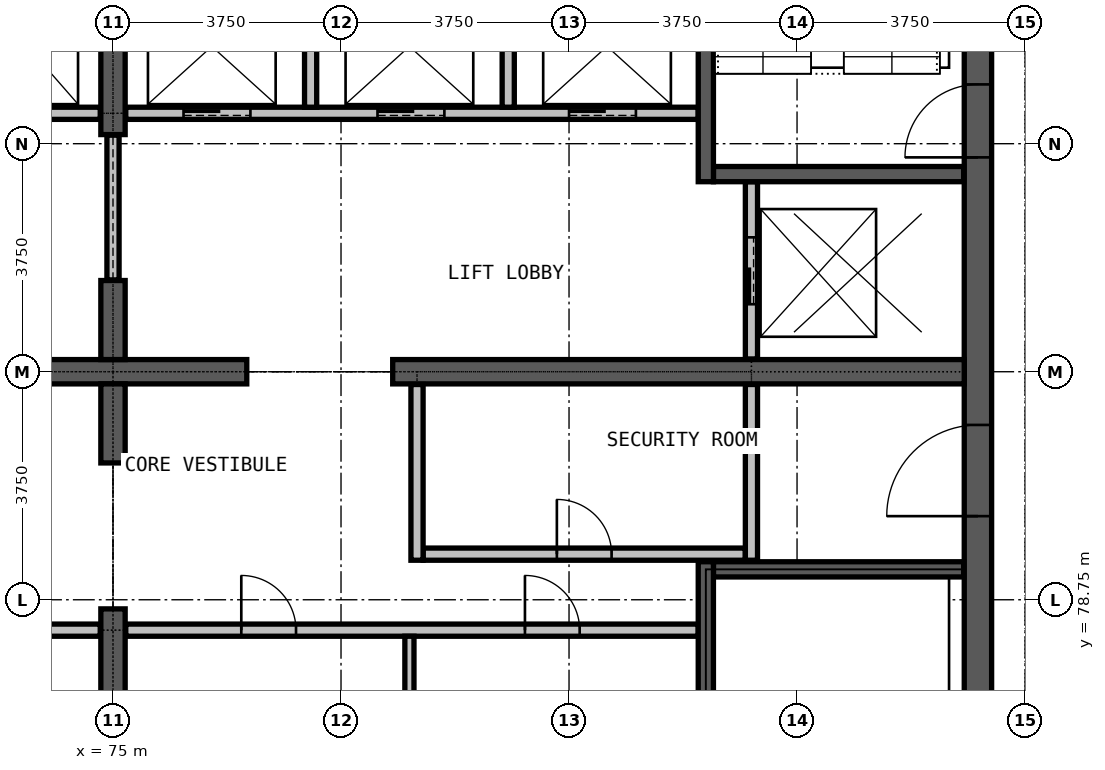
"""IFC4 building model, lengths in metres.
Left out: names, types, materials, properties, quantities, classifications, styles, units other than length and angle.
Written with IfcOpenShell. Run it as: python <this file> out.ifc"""

import sys

from ifc_helpers import new_model, si_unit, direction, frame, frame_2d, origin, place, context, subcontext, project, spatial, rectangle, extrude, element, fill, save


model = new_model("IFC4")
c1 = context("Model", 3, precision=1e-05, world=origin(), true_north=direction((0.0, 1.0)))
c2 = subcontext(c1, "Body", "Model", "MODEL_VIEW")
j1 = project(units=[si_unit("LENGTHUNIT", "METRE"), si_unit("PLANEANGLEUNIT", "RADIAN")], contexts=[c1])
p1 = place(None, origin())
s1 = spatial("IfcSite", under=j1, at=p1, CompositionType="ELEMENT")
p2 = place(p1, origin())
s2 = spatial("IfcBuilding", under=s1, at=p2, CompositionType="ELEMENT")
p3 = place(p2, frame((0.0, 0.0, 258.5)))
s3 = spatial("IfcBuildingStorey", under=s2, at=p3, CompositionType="ELEMENT", Elevation=258.5)
p4 = place(p3, frame((89.225, 72.25, 0.0), z_axis=(0.0, 0.0, 1.0), x_axis=(0.0, 1.0, 0.0)))
e1 = element("IfcWall", 1, at=p4, inside=s3, PredefinedType="SHEAR", context=c2, shape_type="SweptSolid", body=[
    extrude(rectangle(XDim=20.5, YDim=0.45, at=frame_2d((10.25, 0.0))), origin(), (0.0, 0.0, 1.0), 3.6),
])
p5 = place(p4, frame((0.275, 0.0, 0.0)))
e2 = element("IfcOpeningElement", 2, at=p5, cuts=e1, PredefinedType="OPENING", context=c2, shape_type="SweptSolid", body=[
    extrude(rectangle(XDim=1.2, YDim=2.2, at=frame_2d((0.6, 1.1))), frame((0.0, 0.235, 0.0), z_axis=(0.0, -1.0, 0.0), x_axis=(1.0, 0.0, 0.0)), (0.0, 0.0, 1.0), 0.47),
])
p6 = place(p4, frame((13.775, 0.0, 0.0)))
e3 = element("IfcOpeningElement", 3, at=p6, cuts=e1, PredefinedType="OPENING", context=c2, shape_type="SweptSolid", body=[
    extrude(rectangle(XDim=1.2, YDim=2.2, at=frame_2d((0.6, 1.1))), frame((0.0, 0.235, 0.0), z_axis=(0.0, -1.0, 0.0), x_axis=(1.0, 0.0, 0.0)), (0.0, 0.0, 1.0), 0.47),
])
p7 = place(p4, frame((7.875, 0.0, 0.0)))
e4 = element("IfcOpeningElement", 4, at=p7, cuts=e1, PredefinedType="OPENING", context=c2, shape_type="SweptSolid", body=[
    extrude(rectangle(XDim=1.5, YDim=2.2, at=frame_2d((0.75, 1.1))), frame((0.0, 0.235, 0.0), z_axis=(0.0, -1.0, 0.0), x_axis=(1.0, 0.0, 0.0)), (0.0, 0.0, 1.0), 0.47),
])
p8 = place(p3, frame((72.8, 82.5, 0.0), z_axis=(0.0, 0.0, 1.0), x_axis=(1.0, 0.0, 0.0)))
e5 = element("IfcWall", 5, at=p8, inside=s3, PredefinedType="SHEAR", context=c2, shape_type="SweptSolid", body=[
    extrude(rectangle(XDim=4.4, YDim=0.4, at=frame_2d((2.2, 0.0))), origin(), (0.0, 0.0, 1.0), 3.6),
])
p9 = place(p3, frame((79.6, 82.5, 0.0), z_axis=(0.0, 0.0, 1.0), x_axis=(1.0, 0.0, 0.0)))
e6 = element("IfcWall", 6, at=p9, inside=s3, PredefinedType="SHEAR", context=c2, shape_type="SweptSolid", body=[
    extrude(rectangle(XDim=9.4, YDim=0.4, at=frame_2d((4.7, 0.0))), origin(), (0.0, 0.0, 1.0), 3.6),
])
p10 = place(p3, frame((75.0, 72.25, 0.0), z_axis=(0.0, 0.0, 1.0), x_axis=(0.0, 1.0, 0.0)))
e7 = element("IfcWall", 7, at=p10, inside=s3, PredefinedType="SHEAR", context=c2, shape_type="SweptSolid", body=[
    extrude(rectangle(XDim=6.35, YDim=0.4, at=frame_2d((3.175, 0.0))), origin(), (0.0, 0.0, 1.0), 3.6),
])
for number, where, z_axis, x_axis in (
    (8, (75.0, 81.0, 0.0), (0.0, 0.0, 1.0), (0.0, 1.0, 0.0)),
    (9, (75.0, 82.7, 0.0), (0.0, 0.0, 1.0), (0.0, 1.0, 0.0)),
):
    element("IfcWall", number, at=place(p3, frame(where, z_axis=z_axis, x_axis=x_axis)), inside=s3, PredefinedType="SHEAR", context=c2, shape_type="SweptSolid", body=[
        extrude(rectangle(XDim=1.3, YDim=0.4, at=frame_2d((0.65, 0.0))), origin(), (0.0, 0.0, 1.0), 3.6),
    ])
p11 = place(p3, frame((75.0, 86.4, 0.0), z_axis=(0.0, 0.0, 1.0), x_axis=(0.0, 1.0, 0.0)))
e10 = element("IfcWall", 10, at=p11, inside=s3, PredefinedType="SHEAR", context=c2, shape_type="SweptSolid", body=[
    extrude(rectangle(XDim=6.35, YDim=0.4, at=frame_2d((3.175, 0.0))), origin(), (0.0, 0.0, 1.0), 3.6),
])
p12 = place(p3, frame((65.375, 78.25, 0.0), z_axis=(0.0, 0.0, 1.0), x_axis=(1.0, 0.0, 0.0)))
e11 = element("IfcWall", 11, at=p12, inside=s3, PredefinedType="PARTITIONING", context=c2, shape_type="SweptSolid", body=[
    extrude(rectangle(XDim=9.415, YDim=0.2, at=frame_2d((4.708, 0.0))), origin(), (0.0, 0.0, 1.0), 3.3),
])
p13 = place(p12, frame((1.0, 0.0, 0.0)))
e12 = element("IfcOpeningElement", 12, at=p13, cuts=e11, PredefinedType="OPENING", context=c2, shape_type="SweptSolid", body=[
    extrude(rectangle(XDim=0.9, YDim=2.2, at=frame_2d((0.45, 1.1))), frame((0.0, 0.11, 0.0), z_axis=(0.0, -1.0, 0.0), x_axis=(1.0, 0.0, 0.0)), (0.0, 0.0, 1.0), 0.22),
])
p14 = place(p12, frame((5.665, 0.0, 0.0)))
e13 = element("IfcOpeningElement", 13, at=p14, cuts=e11, PredefinedType="OPENING", context=c2, shape_type="SweptSolid", body=[
    extrude(rectangle(XDim=0.9, YDim=2.2, at=frame_2d((0.45, 1.1))), frame((0.0, 0.11, 0.0), z_axis=(0.0, -1.0, 0.0), x_axis=(1.0, 0.0, 0.0)), (0.0, 0.0, 1.0), 0.22),
])
p15 = place(p3, frame((75.21, 78.25, 0.0), z_axis=(0.0, 0.0, 1.0), x_axis=(1.0, 0.0, 0.0)))
e14 = element("IfcWall", 14, at=p15, inside=s3, PredefinedType="PARTITIONING", context=c2, shape_type="SweptSolid", body=[
    extrude(rectangle(XDim=9.415, YDim=0.2, at=frame_2d((4.708, 0.0))), origin(), (0.0, 0.0, 1.0), 3.3),
])
p16 = place(p15, frame((1.9, 0.0, 0.0)))
e15 = element("IfcOpeningElement", 15, at=p16, cuts=e14, PredefinedType="OPENING", context=c2, shape_type="SweptSolid", body=[
    extrude(rectangle(XDim=0.9, YDim=2.2, at=frame_2d((0.45, 1.1))), frame((0.0, 0.11, 0.0), z_axis=(0.0, -1.0, 0.0), x_axis=(1.0, 0.0, 0.0)), (0.0, 0.0, 1.0), 0.22),
])
p17 = place(p15, frame((6.565, 0.0, 0.0)))
e16 = element("IfcOpeningElement", 16, at=p17, cuts=e14, PredefinedType="OPENING", context=c2, shape_type="SweptSolid", body=[
    extrude(rectangle(XDim=0.9, YDim=2.2, at=frame_2d((0.45, 1.1))), frame((0.0, 0.11, 0.0), z_axis=(0.0, -1.0, 0.0), x_axis=(1.0, 0.0, 0.0)), (0.0, 0.0, 1.0), 0.22),
])
p18 = place(p3, frame((80.1, 79.5, 0.0), z_axis=(0.0, 0.0, 1.0), x_axis=(1.0, 0.0, 0.0)))
e17 = element("IfcWall", 17, at=p18, inside=s3, PredefinedType="PARTITIONING", context=c2, shape_type="SweptSolid", body=[
    extrude(rectangle(XDim=5.3, YDim=0.2, at=frame_2d((2.65, 0.0))), origin(), (0.0, 0.0, 1.0), 3.3),
])
p19 = place(p18, frame((2.2, 0.0, 0.0)))
e18 = element("IfcOpeningElement", 18, at=p19, cuts=e17, PredefinedType="OPENING", context=c2, shape_type="SweptSolid", body=[
    extrude(rectangle(XDim=0.9, YDim=2.2, at=frame_2d((0.45, 1.1))), frame((0.0, 0.11, 0.0), z_axis=(0.0, -1.0, 0.0), x_axis=(1.0, 0.0, 0.0)), (0.0, 0.0, 1.0), 0.22),
])
p20 = place(p3, frame((75.0, 84.01, 0.0), z_axis=(0.0, 0.0, 1.0), x_axis=(0.0, 1.0, 0.0)))
e19 = element("IfcWall", 19, at=p20, inside=s3, PredefinedType="PARTITIONING", context=c2, shape_type="SweptSolid", body=[
    extrude(rectangle(XDim=2.38, YDim=0.2, at=frame_2d((1.19, 0.0))), origin(), (0.0, 0.0, 1.0), 2.4),
])
for number, where, z_axis, x_axis in (
    (20, (80.0, 79.4, 0.0), (0.0, 0.0, 1.0), (0.0, 1.0, 0.0)),
    (21, (85.5, 79.4, 0.0), (0.0, 0.0, 1.0), (0.0, 1.0, 0.0)),
):
    element("IfcWall", number, at=place(p3, frame(where, z_axis=z_axis, x_axis=x_axis)), inside=s3, PredefinedType="PARTITIONING", context=c2, shape_type="SweptSolid", body=[
        extrude(rectangle(XDim=2.89, YDim=0.2, at=frame_2d((1.445, 0.0))), origin(), (0.0, 0.0, 1.0), 3.3),
    ])
p21 = place(p3, frame((79.875, 74.35, 0.0), z_axis=(0.0, 0.0, 1.0), x_axis=(0.0, 1.0, 0.0)))
e22 = element("IfcWall", 22, at=p21, inside=s3, PredefinedType="PARTITIONING", context=c2, shape_type="SweptSolid", body=[
    extrude(rectangle(XDim=3.8, YDim=0.15, at=frame_2d((1.9, 0.0))), origin(), (0.0, 0.0, 1.0), 3.3),
])
p22 = place(p3, frame((65.375, 86.75, 0.0), z_axis=(0.0, 0.0, 1.0), x_axis=(1.0, 0.0, 0.0)))
e23 = element("IfcWall", 23, at=p22, inside=s3, PredefinedType="PARTITIONING", context=c2, shape_type="SweptSolid", body=[
    extrude(rectangle(XDim=9.415, YDim=0.2, at=frame_2d((4.708, 0.0))), origin(), (0.0, 0.0, 1.0), 3.3),
])
p23 = place(p22, frame((1.0, 0.0, 0.0)))
e24 = element("IfcOpeningElement", 24, at=p23, cuts=e23, PredefinedType="OPENING", context=c2, shape_type="SweptSolid", body=[
    extrude(rectangle(XDim=1.1, YDim=2.2, at=frame_2d((0.55, 1.1))), frame((0.0, 0.11, 0.0), z_axis=(0.0, -1.0, 0.0), x_axis=(1.0, 0.0, 0.0)), (0.0, 0.0, 1.0), 0.22),
])
p24 = place(p22, frame((4.175, 0.0, 0.0)))
e25 = element("IfcOpeningElement", 25, at=p24, cuts=e23, PredefinedType="OPENING", context=c2, shape_type="SweptSolid", body=[
    extrude(rectangle(XDim=1.1, YDim=2.2, at=frame_2d((0.55, 1.1))), frame((0.0, 0.11, 0.0), z_axis=(0.0, -1.0, 0.0), x_axis=(1.0, 0.0, 0.0)), (0.0, 0.0, 1.0), 0.22),
])
p25 = place(p22, frame((7.325, 0.0, 0.0)))
e26 = element("IfcOpeningElement", 26, at=p25, cuts=e23, PredefinedType="OPENING", context=c2, shape_type="SweptSolid", body=[
    extrude(rectangle(XDim=1.1, YDim=2.2, at=frame_2d((0.55, 1.1))), frame((0.0, 0.11, 0.0), z_axis=(0.0, -1.0, 0.0), x_axis=(1.0, 0.0, 0.0)), (0.0, 0.0, 1.0), 0.22),
])
p26 = place(p3, frame((75.21, 86.75, 0.0), z_axis=(0.0, 0.0, 1.0), x_axis=(1.0, 0.0, 0.0)))
e27 = element("IfcWall", 27, at=p26, inside=s3, PredefinedType="PARTITIONING", context=c2, shape_type="SweptSolid", body=[
    extrude(rectangle(XDim=9.415, YDim=0.2, at=frame_2d((4.708, 0.0))), origin(), (0.0, 0.0, 1.0), 3.3),
])
p27 = place(p26, frame((0.95, 0.0, 0.0)))
e28 = element("IfcOpeningElement", 28, at=p27, cuts=e27, PredefinedType="OPENING", context=c2, shape_type="SweptSolid", body=[
    extrude(rectangle(XDim=1.1, YDim=2.2, at=frame_2d((0.55, 1.1))), frame((0.0, 0.11, 0.0), z_axis=(0.0, -1.0, 0.0), x_axis=(1.0, 0.0, 0.0)), (0.0, 0.0, 1.0), 0.22),
])
p28 = place(p26, frame((4.14, 0.0, 0.0)))
e29 = element("IfcOpeningElement", 29, at=p28, cuts=e27, PredefinedType="OPENING", context=c2, shape_type="SweptSolid", body=[
    extrude(rectangle(XDim=1.1, YDim=2.2, at=frame_2d((0.55, 1.1))), frame((0.0, 0.11, 0.0), z_axis=(0.0, -1.0, 0.0), x_axis=(1.0, 0.0, 0.0)), (0.0, 0.0, 1.0), 0.22),
])
p29 = place(p26, frame((7.29, 0.0, 0.0)))
e30 = element("IfcOpeningElement", 30, at=p29, cuts=e27, PredefinedType="OPENING", context=c2, shape_type="SweptSolid", body=[
    extrude(rectangle(XDim=1.1, YDim=2.2, at=frame_2d((0.55, 1.1))), frame((0.0, 0.11, 0.0), z_axis=(0.0, -1.0, 0.0), x_axis=(1.0, 0.0, 0.0)), (0.0, 0.0, 1.0), 0.22),
])
for number, where, z_axis, x_axis in (
    (31, (78.25, 86.85, 0.0), (0.0, 0.0, 1.0), (0.0, 1.0, 0.0)),
    (32, (81.5, 86.85, 0.0), (0.0, 0.0, 1.0), (0.0, 1.0, 0.0)),
):
    element("IfcWall", number, at=place(p3, frame(where, z_axis=z_axis, x_axis=x_axis)), inside=s3, PredefinedType="PARTITIONING", context=c2, shape_type="SweptSolid", body=[
        extrude(rectangle(XDim=3.8, YDim=0.2, at=frame_2d((1.9, 0.0))), origin(), (0.0, 0.0, 1.0), 3.3),
    ])
p30 = place(p3, frame((85.5, 82.71, 0.0), z_axis=(0.0, 0.0, 1.0), x_axis=(0.0, 1.0, 0.0)))
e33 = element("IfcWall", 33, at=p30, inside=s3, PredefinedType="PARTITIONING", context=c2, shape_type="SweptSolid", body=[
    extrude(rectangle(XDim=2.915, YDim=0.2, at=frame_2d((1.458, 0.0))), origin(), (0.0, 0.0, 1.0), 3.3),
])
p31 = place(p30, frame((0.9, 0.0, 0.0)))
e34 = element("IfcOpeningElement", 34, at=p31, cuts=e33, PredefinedType="OPENING", context=c2, shape_type="SweptSolid", body=[
    extrude(rectangle(XDim=1.1, YDim=2.2, at=frame_2d((0.55, 1.1))), frame((0.0, 0.11, 0.0), z_axis=(0.0, -1.0, 0.0), x_axis=(1.0, 0.0, 0.0)), (0.0, 0.0, 1.0), 0.22),
])
for number, where, z_axis, x_axis in (
    (35, (84.875, 79.25, 0.0), (0.0, 0.0, 1.0), (1.0, 0.0, 0.0)),
    (36, (84.875, 85.75, 0.0), (0.0, 0.0, 1.0), (1.0, 0.0, 0.0)),
):
    element("IfcWall", number, at=place(p3, frame(where, z_axis=z_axis, x_axis=x_axis)), inside=s3, PredefinedType="PARTITIONING", context=c2, shape_type="SweptSolid", body=[
        extrude(rectangle(XDim=4.115, YDim=0.25, at=frame_2d((2.058, 0.0))), origin(), (0.0, 0.0, 1.0), 3.3),
    ])
for number, where, z_axis, x_axis in (
    (37, (84.75, 72.26, 0.0), (0.0, 0.0, 1.0), (0.0, 1.0, 0.0)),
    (38, (84.75, 85.625, 0.0), (0.0, 0.0, 1.0), (0.0, 1.0, 0.0)),
):
    element("IfcWall", number, at=place(p3, frame(where, z_axis=z_axis, x_axis=x_axis)), inside=s3, PredefinedType="PARTITIONING", context=c2, shape_type="SweptSolid", body=[
        extrude(rectangle(XDim=7.115, YDim=0.25, at=frame_2d((3.558, 0.0))), origin(), (0.0, 0.0, 1.0), 3.3),
    ])
p32 = place(p27, origin())
e39 = element("IfcDoor", 39, at=p32, inside=s3, OperationType="DOUBLE_DOOR_SLIDING", PredefinedType="DOOR", context=c2, shape_type="SweptSolid", body=[
    extrude(rectangle(XDim=1.1, YDim=2.2, at=frame_2d((0.55, 1.1))), frame((0.0, 0.025, 0.0), z_axis=(0.0, -1.0, 0.0), x_axis=(1.0, 0.0, 0.0)), (0.0, 0.0, 1.0), 0.05),
])
fill(e28, e39)
p33 = place(p28, origin())
e40 = element("IfcDoor", 40, at=p33, inside=s3, OperationType="DOUBLE_DOOR_SLIDING", PredefinedType="DOOR", context=c2, shape_type="SweptSolid", body=[
    extrude(rectangle(XDim=1.1, YDim=2.2, at=frame_2d((0.55, 1.1))), frame((0.0, 0.025, 0.0), z_axis=(0.0, -1.0, 0.0), x_axis=(1.0, 0.0, 0.0)), (0.0, 0.0, 1.0), 0.05),
])
fill(e29, e40)
p34 = place(p29, origin())
e41 = element("IfcDoor", 41, at=p34, inside=s3, OperationType="DOUBLE_DOOR_SLIDING", PredefinedType="DOOR", context=c2, shape_type="SweptSolid", body=[
    extrude(rectangle(XDim=1.1, YDim=2.2, at=frame_2d((0.55, 1.1))), frame((0.0, 0.025, 0.0), z_axis=(0.0, -1.0, 0.0), x_axis=(1.0, 0.0, 0.0)), (0.0, 0.0, 1.0), 0.05),
])
fill(e30, e41)
p35 = place(p31, origin())
e42 = element("IfcDoor", 42, at=p35, inside=s3, OperationType="DOUBLE_DOOR_SLIDING", PredefinedType="DOOR", context=c2, shape_type="SweptSolid", body=[
    extrude(rectangle(XDim=1.1, YDim=2.2, at=frame_2d((0.55, 1.1))), frame((0.0, 0.025, 0.0), z_axis=(0.0, -1.0, 0.0), x_axis=(1.0, 0.0, 0.0)), (0.0, 0.0, 1.0), 0.05),
])
fill(e34, e42)
p36 = place(p6, origin())
e43 = element("IfcDoor", 43, at=p36, inside=s3, OperationType="SINGLE_SWING_RIGHT", PredefinedType="DOOR", context=c2, shape_type="SweptSolid", body=[
    extrude(rectangle(XDim=1.2, YDim=2.2, at=frame_2d((0.6, 1.1))), frame((0.0, 0.025, 0.0), z_axis=(0.0, -1.0, 0.0), x_axis=(1.0, 0.0, 0.0)), (0.0, 0.0, 1.0), 0.05),
])
fill(e3, e43)
p37 = place(p7, origin())
e44 = element("IfcDoor", 44, at=p37, inside=s3, OperationType="DOUBLE_DOOR_SINGLE_SWING", PredefinedType="DOOR", context=c2, shape_type="SweptSolid", body=[
    extrude(rectangle(XDim=1.5, YDim=2.2, at=frame_2d((0.75, 1.1))), frame((0.0, 0.025, 0.0), z_axis=(0.0, -1.0, 0.0), x_axis=(1.0, 0.0, 0.0)), (0.0, 0.0, 1.0), 0.05),
])
fill(e4, e44)
p38 = place(p19, origin())
e45 = element("IfcDoor", 45, at=p38, inside=s3, OperationType="SINGLE_SWING_LEFT", PredefinedType="DOOR", context=c2, shape_type="SweptSolid", body=[
    extrude(rectangle(XDim=0.9, YDim=2.2, at=frame_2d((0.45, 1.1))), frame((0.0, 0.025, 0.0), z_axis=(0.0, -1.0, 0.0), x_axis=(1.0, 0.0, 0.0)), (0.0, 0.0, 1.0), 0.05),
])
fill(e18, e45)
p39 = place(p16, origin())
e46 = element("IfcDoor", 46, at=p39, inside=s3, OperationType="SINGLE_SWING_RIGHT", PredefinedType="DOOR", context=c2, shape_type="SweptSolid", body=[
    extrude(rectangle(XDim=0.9, YDim=2.2, at=frame_2d((0.45, 1.1))), frame((0.0, 0.025, 0.0), z_axis=(0.0, -1.0, 0.0), x_axis=(1.0, 0.0, 0.0)), (0.0, 0.0, 1.0), 0.05),
])
fill(e15, e46)
p40 = place(p17, origin())
e47 = element("IfcDoor", 47, at=p40, inside=s3, OperationType="SINGLE_SWING_RIGHT", PredefinedType="DOOR", context=c2, shape_type="SweptSolid", body=[
    extrude(rectangle(XDim=0.9, YDim=2.2, at=frame_2d((0.45, 1.1))), frame((0.0, 0.025, 0.0), z_axis=(0.0, -1.0, 0.0), x_axis=(1.0, 0.0, 0.0)), (0.0, 0.0, 1.0), 0.05),
])
fill(e16, e47)
save(model, sys.argv[1])
